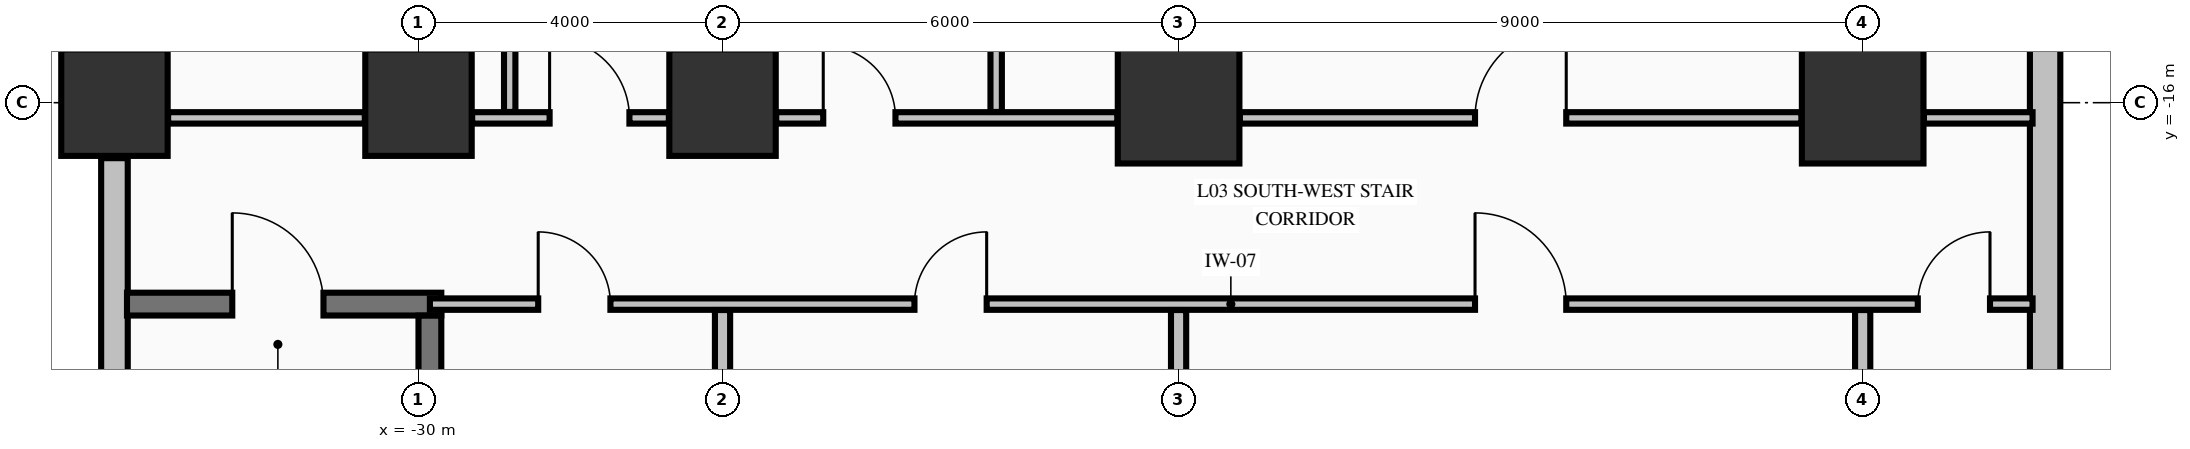
"""IFC4 building model, lengths in metres.
Left out: names, types, materials, properties, quantities, classifications, styles, units other than length and angle.
Written with IfcOpenShell. Run it as: python <this file> out.ifc"""

import sys

from ifc_helpers import new_model, si_unit, direction, frame, frame_2d, origin, origin_2d, place, context, subcontext, project, spatial, rectangle, extrude, element, fill, save


model = new_model("IFC4")
c1 = context("Model", 3, precision=1e-05, world=origin(), true_north=direction((0.0, 1.0)))
c2 = subcontext(c1, "Body", "Model", "MODEL_VIEW")
j1 = project(units=[si_unit("LENGTHUNIT", "METRE"), si_unit("PLANEANGLEUNIT", "RADIAN")], contexts=[c1])
p1 = place(None, origin())
s1 = spatial("IfcSite", under=j1, at=p1, CompositionType="ELEMENT")
p2 = place(p1, origin())
s2 = spatial("IfcBuilding", under=s1, at=p2, CompositionType="ELEMENT")
p3 = place(p2, frame((0.0, 0.0, 16.32)))
s3 = spatial("IfcBuildingStorey", under=s2, at=p3, CompositionType="ELEMENT", Elevation=16.32)
for number, where, z_axis, x_axis in (
    (1, (-34.0, -16.0, 0.0), (0.0, 0.0, 1.0), (1.0, 0.0, 0.0)),
    (2, (-30.0, -16.0, 0.0), (0.0, 0.0, 1.0), (1.0, 0.0, 0.0)),
    (3, (-26.0, -16.0, 0.0), (0.0, 0.0, 1.0), (1.0, 0.0, 0.0)),
):
    element("IfcColumn", number, at=place(p3, frame(where, z_axis=z_axis, x_axis=x_axis)), inside=s3, PredefinedType="COLUMN", context=c2, shape_type="SweptSolid", body=[
        extrude(rectangle(XDim=1.4, YDim=1.4, at=origin_2d()), origin(), (0.0, 0.0, 1.0), 4.99),
    ])
for number, where, z_axis, x_axis in (
    (4, (-20.0, -16.0, 0.0), (0.0, 0.0, 1.0), (1.0, 0.0, 0.0)),
    (5, (-11.0, -16.0, 0.0), (0.0, 0.0, 1.0), (1.0, 0.0, 0.0)),
):
    element("IfcColumn", number, at=place(p3, frame(where, z_axis=z_axis, x_axis=x_axis)), inside=s3, PredefinedType="COLUMN", context=c2, shape_type="SweptSolid", body=[
        extrude(rectangle(XDim=1.6, YDim=1.6, at=origin_2d()), origin(), (0.0, 0.0, 1.0), 4.99),
    ])
p4 = place(p3, frame((-34.0, -21.27, 0.0), z_axis=(0.0, 0.0, 1.0), x_axis=(0.0, 1.0, 0.0)))
e6 = element("IfcWall", 6, at=p4, inside=s3, PredefinedType="STANDARD", context=c2, shape_type="SweptSolid", body=[
    extrude(rectangle(XDim=4.54, YDim=0.35, at=frame_2d((2.27, 0.0))), origin(), (0.0, 0.0, 1.0), 4.99),
])
p5 = place(p3, frame((-8.6, -25.37, 0.0), z_axis=(0.0, 0.0, 1.0), x_axis=(0.0, 1.0, 0.0)))
e7 = element("IfcWall", 7, at=p5, inside=s3, PredefinedType="STANDARD", context=c2, shape_type="SweptSolid", body=[
    extrude(rectangle(XDim=24.72, YDim=0.4, at=frame_2d((12.36, 0.0))), origin(), (0.0, 0.0, 1.0), 2.582),
])
p6 = place(p3, frame((-33.835, -18.65, 0.0), z_axis=(0.0, 0.0, 1.0), x_axis=(1.0, 0.0, 0.0)))
e8 = element("IfcWall", 8, at=p6, inside=s3, PredefinedType="SHEAR", context=c2, shape_type="SweptSolid", body=[
    extrude(rectangle(XDim=4.135, YDim=0.3, at=frame_2d((2.067, 0.0))), origin(), (0.0, 0.0, 1.0), 4.99),
])
p7 = place(p6, frame((1.385, 0.0, 0.0)))
e9 = element("IfcOpeningElement", 9, at=p7, cuts=e8, PredefinedType="OPENING", context=c2, shape_type="SweptSolid", body=[
    extrude(rectangle(XDim=1.2, YDim=2.15, at=frame_2d((0.6, 1.075))), frame((0.0, 0.16, 0.0), z_axis=(0.0, -1.0, 0.0), x_axis=(1.0, 0.0, 0.0)), (0.0, 0.0, 1.0), 0.32),
])
p8 = place(p3, frame((-29.85, -18.65, 0.0), z_axis=(0.0, 0.0, 1.0), x_axis=(1.0, 0.0, 0.0)))
e10 = element("IfcWall", 10, at=p8, inside=s3, PredefinedType="PARTITIONING", context=c2, shape_type="SweptSolid", body=[
    extrude(rectangle(XDim=21.085, YDim=0.15, at=frame_2d((10.542, 0.0))), origin(), (0.0, 0.0, 1.0), 4.99),
])
p9 = place(p8, frame((1.425, 0.0, 0.0)))
e11 = element("IfcOpeningElement", 11, at=p9, cuts=e10, PredefinedType="OPENING", context=c2, shape_type="SweptSolid", body=[
    extrude(rectangle(XDim=0.95, YDim=2.15, at=frame_2d((0.475, 1.075))), frame((0.0, 0.085, 0.0), z_axis=(0.0, -1.0, 0.0), x_axis=(1.0, 0.0, 0.0)), (0.0, 0.0, 1.0), 0.17),
])
p10 = place(p8, frame((6.375, 0.0, 0.0)))
e12 = element("IfcOpeningElement", 12, at=p10, cuts=e10, PredefinedType="OPENING", context=c2, shape_type="SweptSolid", body=[
    extrude(rectangle(XDim=0.95, YDim=2.15, at=frame_2d((0.475, 1.075))), frame((0.0, 0.085, 0.0), z_axis=(0.0, -1.0, 0.0), x_axis=(1.0, 0.0, 0.0)), (0.0, 0.0, 1.0), 0.17),
])
p11 = place(p8, frame((13.75, 0.0, 0.0)))
e13 = element("IfcOpeningElement", 13, at=p11, cuts=e10, PredefinedType="OPENING", context=c2, shape_type="SweptSolid", body=[
    extrude(rectangle(XDim=1.2, YDim=2.15, at=frame_2d((0.6, 1.075))), frame((0.0, 0.085, 0.0), z_axis=(0.0, -1.0, 0.0), x_axis=(1.0, 0.0, 0.0)), (0.0, 0.0, 1.0), 0.17),
])
p12 = place(p8, frame((19.575, 0.0, 0.0)))
e14 = element("IfcOpeningElement", 14, at=p12, cuts=e10, PredefinedType="OPENING", context=c2, shape_type="SweptSolid", body=[
    extrude(rectangle(XDim=0.95, YDim=2.15, at=frame_2d((0.475, 1.075))), frame((0.0, 0.085, 0.0), z_axis=(0.0, -1.0, 0.0), x_axis=(1.0, 0.0, 0.0)), (0.0, 0.0, 1.0), 0.17),
])
p13 = place(p3, frame((-33.294, -16.2, 0.0), z_axis=(0.0, 0.0, 1.0), x_axis=(1.0, 0.0, 0.0)))
e15 = element("IfcWall", 15, at=p13, inside=s3, PredefinedType="PARTITIONING", context=c2, shape_type="SweptSolid", body=[
    extrude(rectangle(XDim=2.588, YDim=0.15, at=frame_2d((1.294, 0.0))), origin(), (0.0, 0.0, 1.0), 3.332),
])
p14 = place(p3, frame((-29.294, -16.2, 0.0), z_axis=(0.0, 0.0, 1.0), x_axis=(1.0, 0.0, 0.0)))
e16 = element("IfcWall", 16, at=p14, inside=s3, PredefinedType="PARTITIONING", context=c2, shape_type="SweptSolid", body=[
    extrude(rectangle(XDim=2.588, YDim=0.15, at=frame_2d((1.294, 0.0))), origin(), (0.0, 0.0, 1.0), 3.332),
])
p15 = place(p14, frame((1.019, 0.0, 0.0)))
e17 = element("IfcOpeningElement", 17, at=p15, cuts=e16, PredefinedType="OPENING", context=c2, shape_type="SweptSolid", body=[
    extrude(rectangle(XDim=1.05, YDim=2.15, at=frame_2d((0.525, 1.075))), frame((0.0, 0.085, 0.0), z_axis=(0.0, -1.0, 0.0), x_axis=(1.0, 0.0, 0.0)), (0.0, 0.0, 1.0), 0.17),
])
p16 = place(p3, frame((-25.294, -16.2, 0.0), z_axis=(0.0, 0.0, 1.0), x_axis=(1.0, 0.0, 0.0)))
e18 = element("IfcWall", 18, at=p16, inside=s3, PredefinedType="PARTITIONING", context=c2, shape_type="SweptSolid", body=[
    extrude(rectangle(XDim=4.488, YDim=0.15, at=frame_2d((2.244, 0.0))), origin(), (0.0, 0.0, 1.0), 3.332),
])
p17 = place(p16, frame((0.619, 0.0, 0.0)))
e19 = element("IfcOpeningElement", 19, at=p17, cuts=e18, PredefinedType="OPENING", context=c2, shape_type="SweptSolid", body=[
    extrude(rectangle(XDim=0.95, YDim=2.15, at=frame_2d((0.475, 1.075))), frame((0.0, 0.085, 0.0), z_axis=(0.0, -1.0, 0.0), x_axis=(1.0, 0.0, 0.0)), (0.0, 0.0, 1.0), 0.17),
])
p18 = place(p3, frame((-19.194, -16.2, 0.0), z_axis=(0.0, 0.0, 1.0), x_axis=(1.0, 0.0, 0.0)))
e20 = element("IfcWall", 20, at=p18, inside=s3, PredefinedType="PARTITIONING", context=c2, shape_type="SweptSolid", body=[
    extrude(rectangle(XDim=7.388, YDim=0.15, at=frame_2d((3.694, 0.0))), origin(), (0.0, 0.0, 1.0), 3.332),
])
p19 = place(p18, frame((3.094, 0.0, 0.0)))
e21 = element("IfcOpeningElement", 21, at=p19, cuts=e20, PredefinedType="OPENING", context=c2, shape_type="SweptSolid", body=[
    extrude(rectangle(XDim=1.2, YDim=2.15, at=frame_2d((0.6, 1.075))), frame((0.0, 0.085, 0.0), z_axis=(0.0, -1.0, 0.0), x_axis=(1.0, 0.0, 0.0)), (0.0, 0.0, 1.0), 0.17),
])
p20 = place(p3, frame((-10.194, -16.2, 0.0), z_axis=(0.0, 0.0, 1.0), x_axis=(1.0, 0.0, 0.0)))
e22 = element("IfcWall", 22, at=p20, inside=s3, PredefinedType="PARTITIONING", context=c2, shape_type="SweptSolid", body=[
    extrude(rectangle(XDim=1.429, YDim=0.15, at=frame_2d((0.715, 0.0))), origin(), (0.0, 0.0, 1.0), 4.99),
])
p21 = place(p3, frame((-29.85, -28.296, 0.0), z_axis=(0.0, 0.0, 1.0), x_axis=(0.0, 1.0, 0.0)))
e23 = element("IfcWall", 23, at=p21, inside=s3, PredefinedType="SHEAR", context=c2, shape_type="SweptSolid", body=[
    extrude(rectangle(XDim=9.494, YDim=0.3, at=frame_2d((4.747, 0.0))), origin(), (0.0, 0.0, 1.0), 4.99),
])
p22 = place(p3, frame((-28.8, -16.122, 0.0), z_axis=(0.0, 0.0, 1.0), x_axis=(0.0, 1.0, 0.0)))
e24 = element("IfcWall", 24, at=p22, inside=s3, PredefinedType="PARTITIONING", context=c2, shape_type="SweptSolid", body=[
    extrude(rectangle(XDim=7.019, YDim=0.15, at=frame_2d((3.51, 0.0))), origin(), (0.0, 0.0, 1.0), 4.99),
])
p23 = place(p22, frame((2.997, 0.0, 0.0)))
e25 = element("IfcOpeningElement", 25, at=p23, cuts=e24, PredefinedType="OPENING", context=c2, shape_type="SweptSolid", body=[
    extrude(rectangle(XDim=1.05, YDim=2.15, at=frame_2d((0.525, 1.075))), frame((0.0, 0.085, 0.0), z_axis=(0.0, -1.0, 0.0), x_axis=(1.0, 0.0, 0.0)), (0.0, 0.0, 1.0), 0.17),
])
p24 = place(p3, frame((-26.0, -21.294, 0.0), z_axis=(0.0, 0.0, 1.0), x_axis=(0.0, 1.0, 0.0)))
e26 = element("IfcWall", 26, at=p24, inside=s3, PredefinedType="PARTITIONING", context=c2, shape_type="SweptSolid", body=[
    extrude(rectangle(XDim=2.566, YDim=0.2, at=frame_2d((1.283, 0.0))), origin(), (0.0, 0.0, 1.0), 3.332),
])
p25 = place(p3, frame((-22.4, -16.122, 0.0), z_axis=(0.0, 0.0, 1.0), x_axis=(0.0, 1.0, 0.0)))
e27 = element("IfcWall", 27, at=p25, inside=s3, PredefinedType="PARTITIONING", context=c2, shape_type="SweptSolid", body=[
    extrude(rectangle(XDim=6.069, YDim=0.15, at=frame_2d((3.035, 0.0))), origin(), (0.0, 0.0, 1.0), 4.99),
])
for number, where, z_axis, x_axis in (
    (28, (-20.0, -21.194, 0.0), (0.0, 0.0, 1.0), (0.0, 1.0, 0.0)),
    (29, (-11.0, -21.194, 0.0), (0.0, 0.0, 1.0), (0.0, 1.0, 0.0)),
):
    element("IfcWall", number, at=place(p3, frame(where, z_axis=z_axis, x_axis=x_axis)), inside=s3, PredefinedType="PARTITIONING", context=c2, shape_type="SweptSolid", body=[
        extrude(rectangle(XDim=2.466, YDim=0.2, at=frame_2d((1.233, 0.0))), origin(), (0.0, 0.0, 1.0), 3.332),
    ])
p26 = place(p7, origin())
e30 = element("IfcDoor", 30, at=p26, inside=s3, OperationType="SINGLE_SWING_LEFT", PredefinedType="DOOR", context=c2, shape_type="SweptSolid", body=[
    extrude(rectangle(XDim=1.2, YDim=2.15, at=frame_2d((0.6, 1.075))), frame((0.0, 0.025, 0.0), z_axis=(0.0, -1.0, 0.0), x_axis=(1.0, 0.0, 0.0)), (0.0, 0.0, 1.0), 0.05),
])
fill(e9, e30)
p27 = place(p17, origin())
e31 = element("IfcDoor", 31, at=p27, inside=s3, OperationType="SINGLE_SWING_LEFT", PredefinedType="DOOR", context=c2, shape_type="SweptSolid", body=[
    extrude(rectangle(XDim=0.95, YDim=2.15, at=frame_2d((0.475, 1.075))), frame((0.0, 0.025, 0.0), z_axis=(0.0, -1.0, 0.0), x_axis=(1.0, 0.0, 0.0)), (0.0, 0.0, 1.0), 0.05),
])
fill(e19, e31)
p28 = place(p19, origin())
e32 = element("IfcDoor", 32, at=p28, inside=s3, OperationType="SINGLE_SWING_RIGHT", PredefinedType="DOOR", context=c2, shape_type="SweptSolid", body=[
    extrude(rectangle(XDim=1.2, YDim=2.15, at=frame_2d((0.6, 1.075))), frame((0.0, 0.025, 0.0), z_axis=(0.0, -1.0, 0.0), x_axis=(1.0, 0.0, 0.0)), (0.0, 0.0, 1.0), 0.05),
])
fill(e21, e32)
p29 = place(p15, origin())
e33 = element("IfcDoor", 33, at=p29, inside=s3, OperationType="SINGLE_SWING_LEFT", PredefinedType="DOOR", context=c2, shape_type="SweptSolid", body=[
    extrude(rectangle(XDim=1.05, YDim=2.15, at=frame_2d((0.525, 1.075))), frame((0.0, 0.025, 0.0), z_axis=(0.0, -1.0, 0.0), x_axis=(1.0, 0.0, 0.0)), (0.0, 0.0, 1.0), 0.05),
])
fill(e17, e33)
p30 = place(p9, origin())
e34 = element("IfcDoor", 34, at=p30, inside=s3, OperationType="SINGLE_SWING_LEFT", PredefinedType="DOOR", context=c2, shape_type="SweptSolid", body=[
    extrude(rectangle(XDim=0.95, YDim=2.15, at=frame_2d((0.475, 1.075))), frame((0.0, 0.025, 0.0), z_axis=(0.0, -1.0, 0.0), x_axis=(1.0, 0.0, 0.0)), (0.0, 0.0, 1.0), 0.05),
])
fill(e11, e34)
p31 = place(p10, origin())
e35 = element("IfcDoor", 35, at=p31, inside=s3, OperationType="SINGLE_SWING_RIGHT", PredefinedType="DOOR", context=c2, shape_type="SweptSolid", body=[
    extrude(rectangle(XDim=0.95, YDim=2.15, at=frame_2d((0.475, 1.075))), frame((0.0, 0.025, 0.0), z_axis=(0.0, -1.0, 0.0), x_axis=(1.0, 0.0, 0.0)), (0.0, 0.0, 1.0), 0.05),
])
fill(e12, e35)
p32 = place(p11, origin())
e36 = element("IfcDoor", 36, at=p32, inside=s3, OperationType="SINGLE_SWING_LEFT", PredefinedType="DOOR", context=c2, shape_type="SweptSolid", body=[
    extrude(rectangle(XDim=1.2, YDim=2.15, at=frame_2d((0.6, 1.075))), frame((0.0, 0.025, 0.0), z_axis=(0.0, -1.0, 0.0), x_axis=(1.0, 0.0, 0.0)), (0.0, 0.0, 1.0), 0.05),
])
fill(e13, e36)
p33 = place(p12, origin())
e37 = element("IfcDoor", 37, at=p33, inside=s3, OperationType="SINGLE_SWING_RIGHT", PredefinedType="DOOR", context=c2, shape_type="SweptSolid", body=[
    extrude(rectangle(XDim=0.95, YDim=2.15, at=frame_2d((0.475, 1.075))), frame((0.0, 0.025, 0.0), z_axis=(0.0, -1.0, 0.0), x_axis=(1.0, 0.0, 0.0)), (0.0, 0.0, 1.0), 0.05),
])
fill(e14, e37)
save(model, sys.argv[1])
